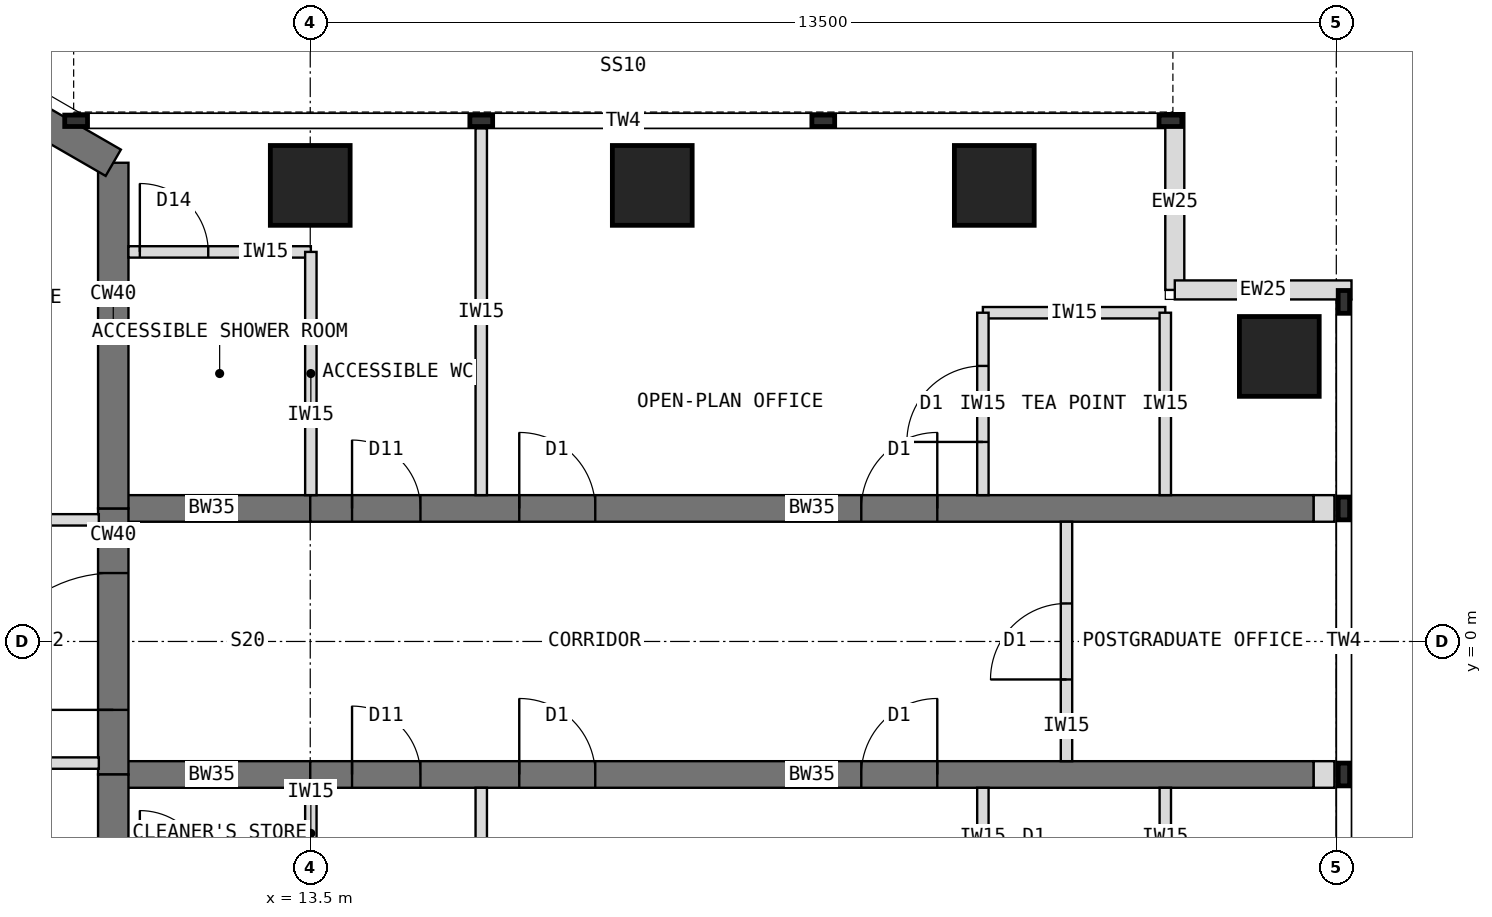
"""IFC4 building model, lengths in metres.
Left out: names, types, materials, properties, quantities, classifications, styles, units other than length and angle.
Written with IfcOpenShell. Run it as: python <this file> out.ifc"""

import sys

from ifc_helpers import new_model, si_unit, direction, frame, frame_2d, origin, origin_2d, place, context, subcontext, project, spatial, rectangle, extrude, element, fill, save


model = new_model("IFC4")
c1 = context("Model", 3, precision=1e-05, world=origin(), true_north=direction((0.0, 1.0)))
c2 = subcontext(c1, "Body", "Model", "MODEL_VIEW")
j1 = project(units=[si_unit("LENGTHUNIT", "METRE"), si_unit("PLANEANGLEUNIT", "RADIAN")], contexts=[c1])
p1 = place(None, origin())
s1 = spatial("IfcSite", under=j1, at=p1, CompositionType="ELEMENT")
p2 = place(p1, origin())
s2 = spatial("IfcBuilding", under=s1, at=p2, CompositionType="ELEMENT")
p3 = place(p2, frame((0.0, 0.0, 247.5)))
s3 = spatial("IfcBuildingStorey", under=s2, at=p3, CompositionType="ELEMENT", Elevation=247.5)
p4 = place(p3, frame((10.908, -6.298, 0.0), z_axis=(0.0, 0.0, 1.0), x_axis=(0.0, 1.0, 0.0)))
e1 = element("IfcWall", 1, at=p4, inside=s3, PredefinedType="SHEAR", context=c2, shape_type="SweptSolid", body=[
    extrude(rectangle(XDim=4.548, YDim=0.4, at=frame_2d((2.274, 0.0))), origin(), (0.0, 0.0, 1.0), 4.0),
])
p5 = place(p3, frame((10.908, -1.75, 0.0), z_axis=(0.0, 0.0, 1.0), x_axis=(0.0, 1.0, 0.0)))
e2 = element("IfcWall", 2, at=p5, inside=s3, PredefinedType="SHEAR", context=c2, shape_type="SweptSolid", body=[
    extrude(rectangle(XDim=3.5, YDim=0.4, at=frame_2d((1.75, 0.0))), origin(), (0.0, 0.0, 1.0), 4.0),
])
p6 = place(p5, frame((0.85, 0.0, 0.0)))
e3 = element("IfcOpeningElement", 3, at=p6, cuts=e2, PredefinedType="OPENING", context=c2, shape_type="SweptSolid", body=[
    extrude(rectangle(XDim=1.8, YDim=2.1, at=frame_2d((0.9, 1.05))), frame((0.0, 0.21, 0.0), z_axis=(0.0, -1.0, 0.0), x_axis=(1.0, 0.0, 0.0)), (0.0, 0.0, 1.0), 0.42),
])
p7 = place(p3, frame((10.908, 1.75, 0.0), z_axis=(0.0, 0.0, 1.0), x_axis=(0.0, 1.0, 0.0)))
e4 = element("IfcWall", 4, at=p7, inside=s3, PredefinedType="SHEAR", context=c2, shape_type="SweptSolid", body=[
    extrude(rectangle(XDim=4.548, YDim=0.4, at=frame_2d((2.274, 0.0))), origin(), (0.0, 0.0, 1.0), 4.0),
])
p8 = place(p3, frame((10.908, 6.298, 0.0), z_axis=(0.0, 0.0, 1.0), x_axis=(-0.866021940709, 0.500005998175, 0.0)))
e5 = element("IfcWall", 5, at=p8, inside=s3, PredefinedType="SHEAR", context=c2, shape_type="SweptSolid", body=[
    extrude(rectangle(XDim=12.596, YDim=0.4, at=frame_2d((6.298, 0.0))), origin(), (0.0, 0.0, 1.0), 4.0),
])
p9 = place(p3, frame((10.908, 1.75, 0.0), z_axis=(0.0, 0.0, 1.0), x_axis=(1.0, 0.0, 0.0)))
e6 = element("IfcWall", 6, at=p9, inside=s3, PredefinedType="SHEAR", context=c2, shape_type="SweptSolid", body=[
    extrude(rectangle(XDim=2.592, YDim=0.35, at=frame_2d((1.296, 0.0))), origin(), (0.0, 0.0, 1.0), 4.0),
])
p10 = place(p3, frame((13.5, 1.75, 0.0), z_axis=(0.0, 0.0, 1.0), x_axis=(1.0, 0.0, 0.0)))
e7 = element("IfcWall", 7, at=p10, inside=s3, PredefinedType="SHEAR", context=c2, shape_type="SweptSolid", body=[
    extrude(rectangle(XDim=13.2, YDim=0.35, at=frame_2d((6.6, 0.0))), origin(), (0.0, 0.0, 1.0), 4.0),
])
p11 = place(p10, frame((0.55, 0.0, 0.0)))
e8 = element("IfcOpeningElement", 8, at=p11, cuts=e7, PredefinedType="OPENING", context=c2, shape_type="SweptSolid", body=[
    extrude(rectangle(XDim=0.9, YDim=2.1, at=frame_2d((0.45, 1.05))), frame((0.0, 0.185, 0.0), z_axis=(0.0, -1.0, 0.0), x_axis=(1.0, 0.0, 0.0)), (0.0, 0.0, 1.0), 0.37),
])
p12 = place(p10, frame((2.75, 0.0, 0.0)))
e9 = element("IfcOpeningElement", 9, at=p12, cuts=e7, PredefinedType="OPENING", context=c2, shape_type="SweptSolid", body=[
    extrude(rectangle(XDim=1.0, YDim=2.1, at=frame_2d((0.5, 1.05))), frame((0.0, 0.185, 0.0), z_axis=(0.0, -1.0, 0.0), x_axis=(1.0, 0.0, 0.0)), (0.0, 0.0, 1.0), 0.37),
])
p13 = place(p10, frame((7.25, 0.0, 0.0)))
e10 = element("IfcOpeningElement", 10, at=p13, cuts=e7, PredefinedType="OPENING", context=c2, shape_type="SweptSolid", body=[
    extrude(rectangle(XDim=1.0, YDim=2.1, at=frame_2d((0.5, 1.05))), frame((0.0, 0.185, 0.0), z_axis=(0.0, -1.0, 0.0), x_axis=(1.0, 0.0, 0.0)), (0.0, 0.0, 1.0), 0.37),
])
p14 = place(p3, frame((10.908, -1.75, 0.0), z_axis=(0.0, 0.0, 1.0), x_axis=(1.0, 0.0, 0.0)))
e11 = element("IfcWall", 11, at=p14, inside=s3, PredefinedType="SHEAR", context=c2, shape_type="SweptSolid", body=[
    extrude(rectangle(XDim=2.592, YDim=0.35, at=frame_2d((1.296, 0.0))), origin(), (0.0, 0.0, 1.0), 4.0),
])
p15 = place(p3, frame((13.5, -1.75, 0.0), z_axis=(0.0, 0.0, 1.0), x_axis=(1.0, 0.0, 0.0)))
e12 = element("IfcWall", 12, at=p15, inside=s3, PredefinedType="SHEAR", context=c2, shape_type="SweptSolid", body=[
    extrude(rectangle(XDim=13.2, YDim=0.35, at=frame_2d((6.6, 0.0))), origin(), (0.0, 0.0, 1.0), 4.0),
])
p16 = place(p15, frame((0.55, 0.0, 0.0)))
e13 = element("IfcOpeningElement", 13, at=p16, cuts=e12, PredefinedType="OPENING", context=c2, shape_type="SweptSolid", body=[
    extrude(rectangle(XDim=0.9, YDim=2.1, at=frame_2d((0.45, 1.05))), frame((0.0, 0.185, 0.0), z_axis=(0.0, -1.0, 0.0), x_axis=(1.0, 0.0, 0.0)), (0.0, 0.0, 1.0), 0.37),
])
p17 = place(p15, frame((2.75, 0.0, 0.0)))
e14 = element("IfcOpeningElement", 14, at=p17, cuts=e12, PredefinedType="OPENING", context=c2, shape_type="SweptSolid", body=[
    extrude(rectangle(XDim=1.0, YDim=2.1, at=frame_2d((0.5, 1.05))), frame((0.0, 0.185, 0.0), z_axis=(0.0, -1.0, 0.0), x_axis=(1.0, 0.0, 0.0)), (0.0, 0.0, 1.0), 0.37),
])
p18 = place(p15, frame((7.25, 0.0, 0.0)))
e15 = element("IfcOpeningElement", 15, at=p18, cuts=e12, PredefinedType="OPENING", context=c2, shape_type="SweptSolid", body=[
    extrude(rectangle(XDim=1.0, YDim=2.1, at=frame_2d((0.5, 1.05))), frame((0.0, 0.185, 0.0), z_axis=(0.0, -1.0, 0.0), x_axis=(1.0, 0.0, 0.0)), (0.0, 0.0, 1.0), 0.37),
])
for number, where, z_axis, x_axis in (
    (16, (13.5, 6.0, 0.0), (0.0, 0.0, 1.0), (1.0, 0.0, 0.0)),
    (17, (18.0, 6.0, 0.0), (0.0, 0.0, 1.0), (1.0, 0.0, 0.0)),
    (18, (22.5, 6.0, 0.0), (0.0, 0.0, 1.0), (1.0, 0.0, 0.0)),
    (19, (26.25, 3.75, 0.0), (0.0, 0.0, 1.0), (1.0, 0.0, 0.0)),
):
    element("IfcColumn", number, at=place(p3, frame(where, z_axis=z_axis, x_axis=x_axis)), inside=s3, PredefinedType="COLUMN", context=c2, shape_type="SweptSolid", body=[
        extrude(rectangle(XDim=1.05, YDim=1.05, at=origin_2d()), origin(), (0.0, 0.0, 1.0), 4.0),
    ])
for number, where, z_axis, x_axis in (
    (20, (24.875, 6.95, 0.0), (0.0, 0.0, 1.0), (0.0, -1.0, 0.0)),
    (21, (24.875, 4.625, 0.0), (0.0, 0.0, 1.0), (1.0, 0.0, 0.0)),
):
    element("IfcWall", number, at=place(p3, frame(where, z_axis=z_axis, x_axis=x_axis)), inside=s3, PredefinedType="STANDARD", context=c2, shape_type="SweptSolid", body=[
        extrude(rectangle(XDim=2.325, YDim=0.25, at=frame_2d((1.163, 0.0))), origin(), (0.0, 0.0, 1.0), 3.8),
    ])
for number, where, z_axis, x_axis in (
    (22, (26.7, 1.75, 0.0), (0.0, 0.0, 1.0), (1.0, 0.0, 0.0)),
    (23, (26.7, -1.75, 0.0), (0.0, 0.0, 1.0), (1.0, 0.0, 0.0)),
):
    element("IfcWall", number, at=place(p3, frame(where, z_axis=z_axis, x_axis=x_axis)), inside=s3, PredefinedType="PARTITIONING", context=c2, shape_type="SweptSolid", body=[
        extrude(rectangle(XDim=0.275, YDim=0.35, at=frame_2d((0.138, 0.0))), origin(), (0.0, 0.0, 1.0), 3.8),
    ])
p19 = place(p3, frame((15.75, 1.925, 0.0), z_axis=(0.0, 0.0, 1.0), x_axis=(0.0, 1.0, 0.0)))
e24 = element("IfcWall", 24, at=p19, inside=s3, PredefinedType="PARTITIONING", context=c2, shape_type="SweptSolid", body=[
    extrude(rectangle(XDim=4.825, YDim=0.15, at=frame_2d((2.413, 0.0))), origin(), (0.0, 0.0, 1.0), 3.8),
])
p20 = place(p3, frame((22.35, 4.325, 0.0), z_axis=(0.0, 0.0, 1.0), x_axis=(1.0, 0.0, 0.0)))
e25 = element("IfcWall", 25, at=p20, inside=s3, PredefinedType="PARTITIONING", context=c2, shape_type="SweptSolid", body=[
    extrude(rectangle(XDim=2.4, YDim=0.15, at=frame_2d((1.2, 0.0))), origin(), (0.0, 0.0, 1.0), 3.8),
])
p21 = place(p3, frame((22.35, 1.925, 0.0), z_axis=(0.0, 0.0, 1.0), x_axis=(0.0, 1.0, 0.0)))
e26 = element("IfcWall", 26, at=p21, inside=s3, PredefinedType="PARTITIONING", context=c2, shape_type="SweptSolid", body=[
    extrude(rectangle(XDim=2.4, YDim=0.15, at=frame_2d((1.2, 0.0))), origin(), (0.0, 0.0, 1.0), 3.8),
])
p22 = place(p21, frame((0.7, 0.0, 0.0)))
e27 = element("IfcOpeningElement", 27, at=p22, cuts=e26, PredefinedType="OPENING", context=c2, shape_type="SweptSolid", body=[
    extrude(rectangle(XDim=1.0, YDim=2.1, at=frame_2d((0.5, 1.05))), frame((0.0, 0.085, 0.0), z_axis=(0.0, -1.0, 0.0), x_axis=(1.0, 0.0, 0.0)), (0.0, 0.0, 1.0), 0.17),
])
p23 = place(p3, frame((24.75, 1.925, 0.0), z_axis=(0.0, 0.0, 1.0), x_axis=(0.0, 1.0, 0.0)))
e28 = element("IfcWall", 28, at=p23, inside=s3, PredefinedType="PARTITIONING", context=c2, shape_type="SweptSolid", body=[
    extrude(rectangle(XDim=2.4, YDim=0.15, at=frame_2d((1.2, 0.0))), origin(), (0.0, 0.0, 1.0), 3.8),
])
p24 = place(p3, frame((11.108, 5.125, 0.0), z_axis=(0.0, 0.0, 1.0), x_axis=(1.0, 0.0, 0.0)))
e29 = element("IfcWall", 29, at=p24, inside=s3, PredefinedType="PARTITIONING", context=c2, shape_type="SweptSolid", body=[
    extrude(rectangle(XDim=2.4, YDim=0.15, at=frame_2d((1.2, 0.0))), origin(), (0.0, 0.0, 1.0), 3.8),
])
p25 = place(p24, frame((0.15, 0.0, 0.0)))
e30 = element("IfcOpeningElement", 30, at=p25, cuts=e29, PredefinedType="OPENING", context=c2, shape_type="SweptSolid", body=[
    extrude(rectangle(XDim=0.9, YDim=2.1, at=frame_2d((0.45, 1.05))), frame((0.0, 0.085, 0.0), z_axis=(0.0, -1.0, 0.0), x_axis=(1.0, 0.0, 0.0)), (0.0, 0.0, 1.0), 0.17),
])
p26 = place(p3, frame((13.508, 1.925, 0.0), z_axis=(0.0, 0.0, 1.0), x_axis=(0.0, 1.0, 0.0)))
e31 = element("IfcWall", 31, at=p26, inside=s3, PredefinedType="PARTITIONING", context=c2, shape_type="SweptSolid", body=[
    extrude(rectangle(XDim=3.2, YDim=0.15, at=frame_2d((1.6, 0.0))), origin(), (0.0, 0.0, 1.0), 3.267),
])
p27 = place(p3, frame((15.75, -1.925, 0.0), z_axis=(0.0, 0.0, 1.0), x_axis=(0.0, -1.0, 0.0)))
e32 = element("IfcWall", 32, at=p27, inside=s3, PredefinedType="PARTITIONING", context=c2, shape_type="SweptSolid", body=[
    extrude(rectangle(XDim=4.825, YDim=0.15, at=frame_2d((2.413, 0.0))), origin(), (0.0, 0.0, 1.0), 3.8),
])
p28 = place(p3, frame((22.35, -1.925, 0.0), z_axis=(0.0, 0.0, 1.0), x_axis=(0.0, -1.0, 0.0)))
e33 = element("IfcWall", 33, at=p28, inside=s3, PredefinedType="PARTITIONING", context=c2, shape_type="SweptSolid", body=[
    extrude(rectangle(XDim=2.4, YDim=0.15, at=frame_2d((1.2, 0.0))), origin(), (0.0, 0.0, 1.0), 3.8),
])
p29 = place(p28, frame((0.7, 0.0, 0.0)))
e34 = element("IfcOpeningElement", 34, at=p29, cuts=e33, PredefinedType="OPENING", context=c2, shape_type="SweptSolid", body=[
    extrude(rectangle(XDim=1.0, YDim=2.1, at=frame_2d((0.5, 1.05))), frame((0.0, 0.085, 0.0), z_axis=(0.0, -1.0, 0.0), x_axis=(1.0, 0.0, 0.0)), (0.0, 0.0, 1.0), 0.17),
])
p30 = place(p3, frame((24.75, -1.925, 0.0), z_axis=(0.0, 0.0, 1.0), x_axis=(0.0, -1.0, 0.0)))
e35 = element("IfcWall", 35, at=p30, inside=s3, PredefinedType="PARTITIONING", context=c2, shape_type="SweptSolid", body=[
    extrude(rectangle(XDim=2.4, YDim=0.15, at=frame_2d((1.2, 0.0))), origin(), (0.0, 0.0, 1.0), 3.8),
])
p31 = place(p3, frame((13.508, -1.925, 0.0), z_axis=(0.0, 0.0, 1.0), x_axis=(0.0, -1.0, 0.0)))
e36 = element("IfcWall", 36, at=p31, inside=s3, PredefinedType="PARTITIONING", context=c2, shape_type="SweptSolid", body=[
    extrude(rectangle(XDim=1.2, YDim=0.15, at=frame_2d((0.6, 0.0))), origin(), (0.0, 0.0, 1.0), 3.267),
])
p32 = place(p3, frame((6.1, 1.6, 0.0), z_axis=(0.0, 0.0, 1.0), x_axis=(1.0, 0.0, 0.0)))
e37 = element("IfcWall", 37, at=p32, inside=s3, PredefinedType="PARTITIONING", context=c2, shape_type="SweptSolid", body=[
    extrude(rectangle(XDim=4.618, YDim=0.15, at=frame_2d((2.309, 0.0))), origin(), (0.0, 0.0, 1.0), 3.8),
])
p33 = place(p32, frame((1.819, 0.0, 0.0)))
e38 = element("IfcOpeningElement", 38, at=p33, cuts=e37, PredefinedType="OPENING", context=c2, shape_type="SweptSolid", body=[
    extrude(rectangle(XDim=1.0, YDim=2.1, at=frame_2d((0.5, 1.05))), frame((0.0, 0.085, 0.0), z_axis=(0.0, -1.0, 0.0), x_axis=(1.0, 0.0, 0.0)), (0.0, 0.0, 1.0), 0.17),
])
p34 = place(p3, frame((10.718, -1.6, 0.0), z_axis=(0.0, 0.0, 1.0), x_axis=(-1.0, 0.0, 0.0)))
e39 = element("IfcWall", 39, at=p34, inside=s3, PredefinedType="PARTITIONING", context=c2, shape_type="SweptSolid", body=[
    extrude(rectangle(XDim=4.618, YDim=0.15, at=frame_2d((2.309, 0.0))), origin(), (0.0, 0.0, 1.0), 3.8),
])
p35 = place(p34, frame((1.799, 0.0, 0.0)))
e40 = element("IfcOpeningElement", 40, at=p35, cuts=e39, PredefinedType="OPENING", context=c2, shape_type="SweptSolid", body=[
    extrude(rectangle(XDim=1.0, YDim=2.1, at=frame_2d((0.5, 1.05))), frame((0.0, 0.085, 0.0), z_axis=(0.0, -1.0, 0.0), x_axis=(1.0, 0.0, 0.0)), (0.0, 0.0, 1.0), 0.17),
])
p36 = place(p3, frame((23.45, -1.575, 0.0), z_axis=(0.0, 0.0, 1.0), x_axis=(0.0, 1.0, 0.0)))
e41 = element("IfcWall", 41, at=p36, inside=s3, PredefinedType="PARTITIONING", context=c2, shape_type="SweptSolid", body=[
    extrude(rectangle(XDim=3.15, YDim=0.15, at=frame_2d((1.575, 0.0))), origin(), (0.0, 0.0, 1.0), 3.8),
])
p37 = place(p36, frame((1.075, 0.0, 0.0)))
e42 = element("IfcOpeningElement", 42, at=p37, cuts=e41, PredefinedType="OPENING", context=c2, shape_type="SweptSolid", body=[
    extrude(rectangle(XDim=1.0, YDim=2.1, at=frame_2d((0.5, 1.05))), frame((0.0, 0.085, 0.0), z_axis=(0.0, -1.0, 0.0), x_axis=(1.0, 0.0, 0.0)), (0.0, 0.0, 1.0), 0.17),
])
p38 = place(p6, origin())
e43 = element("IfcDoor", 43, at=p38, inside=s3, OperationType="DOUBLE_DOOR_DOUBLE_SWING", PredefinedType="DOOR", context=c2, shape_type="SweptSolid", body=[
    extrude(rectangle(XDim=1.8, YDim=2.1, at=frame_2d((0.9, 1.05))), frame((0.0, 0.025, 0.0), z_axis=(0.0, -1.0, 0.0), x_axis=(1.0, 0.0, 0.0)), (0.0, 0.0, 1.0), 0.05),
])
fill(e3, e43)
p39 = place(p22, origin())
e44 = element("IfcDoor", 44, at=p39, inside=s3, OperationType="SINGLE_SWING_LEFT", PredefinedType="DOOR", context=c2, shape_type="SweptSolid", body=[
    extrude(rectangle(XDim=1.0, YDim=2.1, at=frame_2d((0.5, 1.05))), frame((0.0, 0.025, 0.0), z_axis=(0.0, -1.0, 0.0), x_axis=(1.0, 0.0, 0.0)), (0.0, 0.0, 1.0), 0.05),
])
fill(e27, e44)
p40 = place(p25, origin())
e45 = element("IfcDoor", 45, at=p40, inside=s3, OperationType="SINGLE_SWING_LEFT", PredefinedType="DOOR", context=c2, shape_type="SweptSolid", body=[
    extrude(rectangle(XDim=0.9, YDim=2.1, at=frame_2d((0.45, 1.05))), frame((0.0, 0.025, 0.0), z_axis=(0.0, -1.0, 0.0), x_axis=(1.0, 0.0, 0.0)), (0.0, 0.0, 1.0), 0.05),
])
fill(e30, e45)
p41 = place(p37, origin())
e46 = element("IfcDoor", 46, at=p41, inside=s3, OperationType="SINGLE_SWING_LEFT", PredefinedType="DOOR", context=c2, shape_type="SweptSolid", body=[
    extrude(rectangle(XDim=1.0, YDim=2.1, at=frame_2d((0.5, 1.05))), frame((0.0, 0.025, 0.0), z_axis=(0.0, -1.0, 0.0), x_axis=(1.0, 0.0, 0.0)), (0.0, 0.0, 1.0), 0.05),
])
fill(e42, e46)
p42 = place(p11, origin())
e47 = element("IfcDoor", 47, at=p42, inside=s3, OperationType="SINGLE_SWING_LEFT", PredefinedType="DOOR", context=c2, shape_type="SweptSolid", body=[
    extrude(rectangle(XDim=0.9, YDim=2.1, at=frame_2d((0.45, 1.05))), frame((0.0, 0.025, 0.0), z_axis=(0.0, -1.0, 0.0), x_axis=(1.0, 0.0, 0.0)), (0.0, 0.0, 1.0), 0.05),
])
fill(e8, e47)
p43 = place(p12, origin())
e48 = element("IfcDoor", 48, at=p43, inside=s3, OperationType="SINGLE_SWING_LEFT", PredefinedType="DOOR", context=c2, shape_type="SweptSolid", body=[
    extrude(rectangle(XDim=1.0, YDim=2.1, at=frame_2d((0.5, 1.05))), frame((0.0, 0.025, 0.0), z_axis=(0.0, -1.0, 0.0), x_axis=(1.0, 0.0, 0.0)), (0.0, 0.0, 1.0), 0.05),
])
fill(e9, e48)
p44 = place(p13, origin())
e49 = element("IfcDoor", 49, at=p44, inside=s3, OperationType="SINGLE_SWING_RIGHT", PredefinedType="DOOR", context=c2, shape_type="SweptSolid", body=[
    extrude(rectangle(XDim=1.0, YDim=2.1, at=frame_2d((0.5, 1.05))), frame((0.0, 0.025, 0.0), z_axis=(0.0, -1.0, 0.0), x_axis=(1.0, 0.0, 0.0)), (0.0, 0.0, 1.0), 0.05),
])
fill(e10, e49)
p45 = place(p16, origin())
e50 = element("IfcDoor", 50, at=p45, inside=s3, OperationType="SINGLE_SWING_LEFT", PredefinedType="DOOR", context=c2, shape_type="SweptSolid", body=[
    extrude(rectangle(XDim=0.9, YDim=2.1, at=frame_2d((0.45, 1.05))), frame((0.0, 0.025, 0.0), z_axis=(0.0, -1.0, 0.0), x_axis=(1.0, 0.0, 0.0)), (0.0, 0.0, 1.0), 0.05),
])
fill(e13, e50)
p46 = place(p17, origin())
e51 = element("IfcDoor", 51, at=p46, inside=s3, OperationType="SINGLE_SWING_LEFT", PredefinedType="DOOR", context=c2, shape_type="SweptSolid", body=[
    extrude(rectangle(XDim=1.0, YDim=2.1, at=frame_2d((0.5, 1.05))), frame((0.0, 0.025, 0.0), z_axis=(0.0, -1.0, 0.0), x_axis=(1.0, 0.0, 0.0)), (0.0, 0.0, 1.0), 0.05),
])
fill(e14, e51)
p47 = place(p18, origin())
e52 = element("IfcDoor", 52, at=p47, inside=s3, OperationType="SINGLE_SWING_RIGHT", PredefinedType="DOOR", context=c2, shape_type="SweptSolid", body=[
    extrude(rectangle(XDim=1.0, YDim=2.1, at=frame_2d((0.5, 1.05))), frame((0.0, 0.025, 0.0), z_axis=(0.0, -1.0, 0.0), x_axis=(1.0, 0.0, 0.0)), (0.0, 0.0, 1.0), 0.05),
])
fill(e15, e52)
save(model, sys.argv[1])
